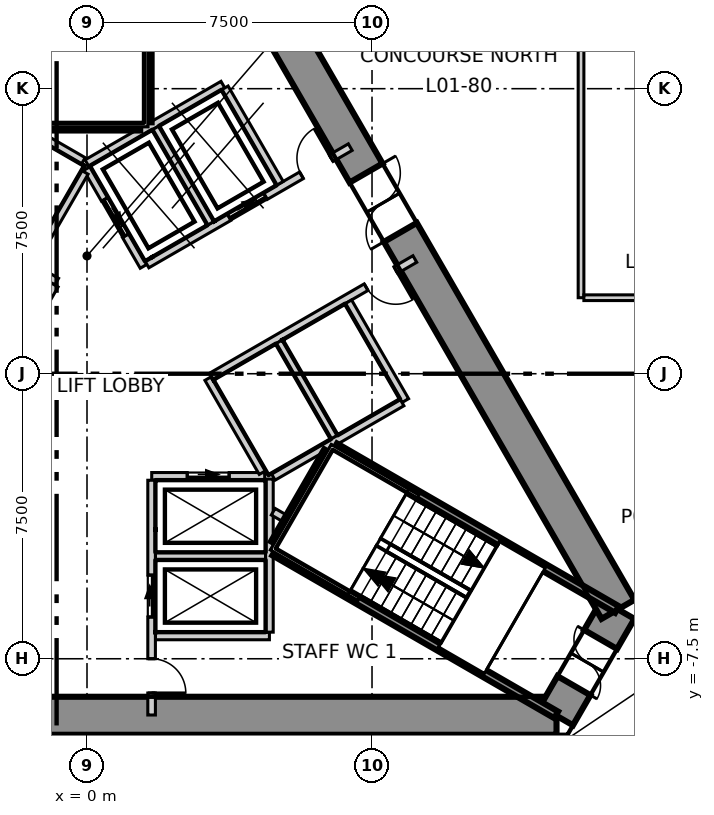
"""IFC4 building model, lengths in metres.
Left out: names, types, materials, properties, quantities, classifications, styles, units other than length and angle.
Written with IfcOpenShell. Run it as: python <this file> out.ifc"""

import sys

from ifc_helpers import new_model, si_unit, direction, frame, frame_2d, origin, place, context, subcontext, project, spatial, polyline, rectangle, outline, extrude, element, fill, save


model = new_model("IFC4")
c1 = context("Model", 3, precision=1e-05, world=origin(), true_north=direction((0.0, 1.0)))
c2 = subcontext(c1, "Body", "Model", "MODEL_VIEW")
j1 = project(units=[si_unit("LENGTHUNIT", "METRE"), si_unit("PLANEANGLEUNIT", "RADIAN")], contexts=[c1])
p1 = place(None, origin())
s1 = spatial("IfcSite", under=j1, at=p1, CompositionType="ELEMENT")
p2 = place(p1, origin())
s2 = spatial("IfcBuilding", under=s1, at=p2, CompositionType="ELEMENT")
p3 = place(p2, frame((0.0, 0.0, 8.5)))
s3 = spatial("IfcBuildingStorey", under=s2, at=p3, CompositionType="ELEMENT", Elevation=8.5)
p4 = place(p3, frame((-12.355, -9.0, -0.4), z_axis=(0.0, 0.0, 1.0), x_axis=(1.0, 0.0, 0.0)))
e1 = element("IfcWall", 1, at=p4, inside=s3, PredefinedType="SHEAR", context=c2, shape_type="SweptSolid", body=[
    extrude(outline(polyline([(-0.289, -0.5), (1.656, -0.5), (3.601, -0.5), (5.547, -0.5), (7.492, -0.5), (9.437, -0.5), (11.382, -0.5), (13.328, -0.5), (15.273, -0.5), (17.218, -0.5), (19.163, -0.5), (21.109, -0.5), (23.054, -0.5), (24.999, -0.5), (24.422, 0.5), (22.566, 0.5), (20.709, 0.5), (18.853, 0.5), (16.996, 0.5), (15.14, 0.5), (13.283, 0.5), (11.427, 0.5), (9.57, 0.5), (7.714, 0.5), (5.857, 0.5), (4.001, 0.5), (2.145, 0.5), (0.288, 0.5), (-0.289, -0.5)])), origin(), (0.0, 0.0, 1.0), 6.0),
])
p5 = place(p3, frame((12.355, -9.0, -0.4), z_axis=(0.0, 0.0, 1.0), x_axis=(0.500077567175, 0.865980615723, 0.0)))
e2 = element("IfcWall", 2, at=p5, inside=s3, PredefinedType="SHEAR", context=c2, shape_type="SweptSolid", body=[
    extrude(outline(polyline([(-0.288, -0.5), (1.617, -0.5), (3.522, -0.5), (2.945, 0.5), (1.617, 0.5), (0.289, 0.499), (-0.288, -0.5)])), origin(), (0.0, 0.0, 1.0), 6.0),
])
p6 = place(p5, frame((0.917, 0.0, 0.4)))
e3 = element("IfcOpeningElement", 3, at=p6, cuts=e2, PredefinedType="OPENING", context=c2, shape_type="SweptSolid", body=[
    extrude(rectangle(XDim=1.4, YDim=2.1, at=frame_2d((0.7, 1.05))), frame((0.0, 0.51, 0.0), z_axis=(0.0, -1.0, 0.0), x_axis=(1.0, 0.0, 0.0)), (0.0, 0.0, 1.0), 1.02),
])
p7 = place(p3, frame((13.972, -6.2, -0.4), z_axis=(0.0, 0.0, 1.0), x_axis=(-0.499992141631, 0.866029940768, 0.0)))
e4 = element("IfcWall", 4, at=p7, inside=s3, PredefinedType="SHEAR", context=c2, shape_type="SweptSolid", body=[
    extrude(outline(polyline([(-0.288, -0.5), (1.657, -0.5), (3.602, -0.5), (5.547, -0.5), (7.493, -0.5), (9.438, -0.5), (11.383, -0.5), (13.328, -0.5), (15.273, -0.5), (17.218, -0.499), (19.164, -0.499), (21.109, -0.499), (23.054, -0.499), (24.999, -0.499), (24.422, 0.5), (22.566, 0.5), (20.709, 0.5), (18.853, 0.5), (16.996, 0.5), (15.14, 0.5), (13.283, 0.5), (11.427, 0.5), (9.57, 0.5), (7.714, 0.5), (5.857, 0.5), (4.001, 0.5), (2.145, 0.5), (0.288, 0.5), (-0.288, -0.5)])), origin(), (0.0, 0.0, 1.0), 6.0),
])
p8 = place(p7, frame((11.455, 0.0, 0.4)))
e5 = element("IfcOpeningElement", 5, at=p8, cuts=e4, PredefinedType="OPENING", context=c2, shape_type="SweptSolid", body=[
    extrude(rectangle(XDim=1.8, YDim=2.1, at=frame_2d((0.9, 1.05))), frame((0.0, 0.51, 0.0), z_axis=(0.0, -1.0, 0.0), x_axis=(1.0, 0.0, 0.0)), (0.0, 0.0, 1.0), 1.02),
])
p9 = place(p3, frame((13.0, 2.0, 0.0), z_axis=(0.0, 0.0, 1.0), x_axis=(0.0, 1.0, 0.0)))
e6 = element("IfcWall", 6, at=p9, inside=s3, PredefinedType="PARTITIONING", context=c2, shape_type="SweptSolid", body=[
    extrude(rectangle(XDim=7.0, YDim=0.15, at=frame_2d((3.5, 0.0))), origin(), (0.0, 0.0, 1.0), 5.6),
])
p10 = place(p3, frame((14.246, -12.125, 0.0), z_axis=(0.0, 0.0, 1.0), x_axis=(0.500018862428, 0.866014513283, 0.0)))
e7 = element("IfcWall", 7, at=p10, inside=s3, PredefinedType="PARTITIONING", context=c2, shape_type="SweptSolid", body=[
    extrude(rectangle(XDim=5.11, YDim=0.15, at=frame_2d((2.555, 0.0))), origin(), (0.0, 0.0, 1.0), 5.6),
])
p11 = place(p10, frame((1.669, 0.0, 0.0)))
e8 = element("IfcOpeningElement", 8, at=p11, cuts=e7, PredefinedType="OPENING", context=c2, shape_type="SweptSolid", body=[
    extrude(rectangle(XDim=1.8, YDim=2.1, at=frame_2d((0.9, 1.05))), frame((0.0, 0.085, 0.0), z_axis=(0.0, -1.0, 0.0), x_axis=(1.0, 0.0, 0.0)), (0.0, 0.0, 1.0), 0.17),
])
p12 = place(p3, frame((13.075, 2.0, 0.0), z_axis=(0.0, 0.0, 1.0), x_axis=(1.0, 0.0, 0.0)))
e9 = element("IfcWall", 9, at=p12, inside=s3, PredefinedType="PARTITIONING", context=c2, shape_type="SweptSolid", body=[
    extrude(rectangle(XDim=6.237, YDim=0.15, at=frame_2d((3.119, 0.0))), origin(), (0.0, 0.0, 1.0), 5.05),
])
p13 = place(p3, frame((1.8, -4.8, 0.0), z_axis=(0.0, 0.0, 1.0), x_axis=(1.0, 0.0, 0.0)))
e10 = element("IfcWall", 10, at=p13, inside=s3, PredefinedType="SOLIDWALL", context=c2, shape_type="SweptSolid", body=[
    extrude(rectangle(XDim=2.9, YDim=0.2, at=frame_2d((1.45, 0.0))), origin(), (0.0, 0.0, 1.0), 5.6),
])
p14 = place(p3, frame((1.8, -6.9, 0.0), z_axis=(0.0, 0.0, 1.0), x_axis=(1.0, 0.0, 0.0)))
e11 = element("IfcWall", 11, at=p14, inside=s3, PredefinedType="SOLIDWALL", context=c2, shape_type="SweptSolid", body=[
    extrude(rectangle(XDim=3.0, YDim=0.2, at=frame_2d((1.5, 0.0))), origin(), (0.0, 0.0, 1.0), 5.6),
])
p15 = place(p3, frame((1.703, -2.7, 0.0), z_axis=(0.0, 0.0, 1.0), x_axis=(1.0, 0.0, 0.0)))
e12 = element("IfcWall", 12, at=p15, inside=s3, PredefinedType="SOLIDWALL", context=c2, shape_type="SweptSolid", body=[
    extrude(rectangle(XDim=2.973, YDim=0.2, at=frame_2d((1.487, 0.0))), origin(), (0.0, 0.0, 1.0), 5.6),
])
p16 = place(p15, frame((0.936, 0.0, 0.0)))
e13 = element("IfcOpeningElement", 13, at=p16, cuts=e12, PredefinedType="OPENING", context=c2, shape_type="SweptSolid", body=[
    extrude(rectangle(XDim=1.1, YDim=2.1, at=frame_2d((0.55, 1.05))), frame((0.0, 0.11, 0.0), z_axis=(0.0, -1.0, 0.0), x_axis=(1.0, 0.0, 0.0)), (0.0, 0.0, 1.0), 0.22),
])
p17 = place(p3, frame((-0.002, 5.541, 0.0), z_axis=(0.0, 0.0, 1.0), x_axis=(0.86600155993, 0.500041296494, 0.0)))
e14 = element("IfcWall", 14, at=p17, inside=s3, PredefinedType="SOLIDWALL", context=c2, shape_type="SweptSolid", body=[
    extrude(rectangle(XDim=4.132, YDim=0.2, at=frame_2d((2.066, 0.0))), origin(), (0.0, 0.0, 1.0), 5.6),
])
p18 = place(p3, frame((0.0, 5.4, 0.0), z_axis=(0.0, 0.0, 1.0), x_axis=(0.500103862429, -0.865965430478, 0.0)))
e15 = element("IfcWall", 15, at=p18, inside=s3, PredefinedType="SOLIDWALL", context=c2, shape_type="SweptSolid", body=[
    extrude(rectangle(XDim=2.973, YDim=0.2, at=frame_2d((1.487, 0.0))), origin(), (0.0, 0.0, 1.0), 5.6),
])
p19 = place(p18, frame((0.937, 0.0, 0.0)))
e16 = element("IfcOpeningElement", 16, at=p19, cuts=e15, PredefinedType="OPENING", context=c2, shape_type="SweptSolid", body=[
    extrude(rectangle(XDim=1.1, YDim=2.1, at=frame_2d((0.55, 1.05))), frame((0.0, 0.11, 0.0), z_axis=(0.0, -1.0, 0.0), x_axis=(1.0, 0.0, 0.0)), (0.0, 0.0, 1.0), 0.22),
])
p20 = place(p3, frame((3.19, -0.125, 0.0), z_axis=(0.0, 0.0, 1.0), x_axis=(0.499988658015, -0.866031951983, 0.0)))
e17 = element("IfcWall", 17, at=p20, inside=s3, PredefinedType="SOLIDWALL", context=c2, shape_type="SweptSolid", body=[
    extrude(rectangle(XDim=2.858, YDim=0.2, at=frame_2d((1.429, 0.0))), origin(), (0.0, 0.0, 1.0), 5.6),
])
p21 = place(p3, frame((1.578, 2.874, 0.0), z_axis=(0.0, 0.0, 1.0), x_axis=(0.866055259465, 0.499948284879, 0.0)))
e18 = element("IfcWall", 18, at=p21, inside=s3, PredefinedType="SOLIDWALL", context=c2, shape_type="SweptSolid", body=[
    extrude(rectangle(XDim=6.177, YDim=0.2, at=frame_2d((3.088, 0.0))), origin(), (0.0, 0.0, 1.0), 5.6),
])
p22 = place(p21, frame((2.496, 0.0, 0.0)))
e19 = element("IfcOpeningElement", 19, at=p22, cuts=e18, PredefinedType="OPENING", context=c2, shape_type="SweptSolid", body=[
    extrude(rectangle(XDim=1.1, YDim=2.1, at=frame_2d((0.55, 1.05))), frame((0.0, 0.11, 0.0), z_axis=(0.0, -1.0, 0.0), x_axis=(1.0, 0.0, 0.0)), (0.0, 0.0, 1.0), 0.22),
])
p23 = place(p21, frame((4.696, 0.0, 0.0)))
e20 = element("IfcOpeningElement", 20, at=p23, cuts=e18, PredefinedType="OPENING", context=c2, shape_type="SweptSolid", body=[
    extrude(rectangle(XDim=0.9, YDim=2.1, at=frame_2d((0.45, 1.05))), frame((0.0, 0.11, 0.0), z_axis=(0.0, -1.0, 0.0), x_axis=(1.0, 0.0, 0.0)), (0.0, 0.0, 1.0), 0.22),
])
p24 = place(p3, frame((1.7, -8.98, 0.0), z_axis=(0.0, 0.0, 1.0), x_axis=(0.0, 1.0, 0.0)))
e21 = element("IfcWall", 21, at=p24, inside=s3, PredefinedType="SOLIDWALL", context=c2, shape_type="SweptSolid", body=[
    extrude(rectangle(XDim=6.177, YDim=0.2, at=frame_2d((3.088, 0.0))), origin(), (0.0, 0.0, 1.0), 5.6),
])
p25 = place(p24, frame((2.58, 0.0, 0.0)))
e22 = element("IfcOpeningElement", 22, at=p25, cuts=e21, PredefinedType="OPENING", context=c2, shape_type="SweptSolid", body=[
    extrude(rectangle(XDim=1.1, YDim=2.1, at=frame_2d((0.55, 1.05))), frame((0.0, 0.11, 0.0), z_axis=(0.0, -1.0, 0.0), x_axis=(1.0, 0.0, 0.0)), (0.0, 0.0, 1.0), 0.22),
])
p26 = place(p24, frame((0.58, 0.0, 0.0)))
e23 = element("IfcOpeningElement", 23, at=p26, cuts=e21, PredefinedType="OPENING", context=c2, shape_type="SweptSolid", body=[
    extrude(rectangle(XDim=0.9, YDim=2.1, at=frame_2d((0.45, 1.05))), frame((0.0, 0.11, 0.0), z_axis=(0.0, -1.0, 0.0), x_axis=(1.0, 0.0, 0.0)), (0.0, 0.0, 1.0), 0.22),
])
p27 = place(p3, frame((4.8, -6.8, 0.0), z_axis=(0.0, 0.0, 1.0), x_axis=(0.0, 1.0, 0.0)))
e24 = element("IfcWall", 24, at=p27, inside=s3, PredefinedType="SOLIDWALL", context=c2, shape_type="SweptSolid", body=[
    extrude(rectangle(XDim=4.029, YDim=0.2, at=frame_2d((2.015, 0.0))), origin(), (0.0, 0.0, 1.0), 5.6),
])
p28 = place(p3, frame((3.278, -0.071, 0.0), z_axis=(0.0, 0.0, 1.0), x_axis=(0.865959795517, 0.500113619639, 0.0)))
e25 = element("IfcWall", 25, at=p28, inside=s3, PredefinedType="SOLIDWALL", context=c2, shape_type="SweptSolid", body=[
    extrude(rectangle(XDim=6.177, YDim=0.2, at=frame_2d((3.088, 0.0))), origin(), (0.0, 0.0, 1.0), 5.6),
])
p29 = place(p28, frame((4.697, 0.0, 0.0)))
e26 = element("IfcOpeningElement", 26, at=p29, cuts=e25, PredefinedType="OPENING", context=c2, shape_type="SweptSolid", body=[
    extrude(rectangle(XDim=0.9, YDim=2.1, at=frame_2d((0.45, 1.05))), frame((0.0, 0.11, 0.0), z_axis=(0.0, -1.0, 0.0), x_axis=(1.0, 0.0, 0.0)), (0.0, 0.0, 1.0), 0.22),
])
p30 = place(p3, frame((3.626, 7.52, 0.0), z_axis=(0.0, 0.0, 1.0), x_axis=(0.500060147554, -0.865990674793, 0.0)))
e27 = element("IfcWall", 27, at=p30, inside=s3, PredefinedType="SOLIDWALL", context=c2, shape_type="SweptSolid", body=[
    extrude(rectangle(XDim=2.9, YDim=0.2, at=frame_2d((1.45, 0.0))), origin(), (0.0, 0.0, 1.0), 5.6),
])
p31 = place(p3, frame((6.876, 1.891, 0.0), z_axis=(0.0, 0.0, 1.0), x_axis=(0.499990139034, -0.866031096941, 0.0)))
e28 = element("IfcWall", 28, at=p31, inside=s3, PredefinedType="SOLIDWALL", context=c2, shape_type="SweptSolid", body=[
    extrude(rectangle(XDim=3.0, YDim=0.2, at=frame_2d((1.5, 0.0))), origin(), (0.0, 0.0, 1.0), 5.6),
])
for number, where, z_axis, x_axis in (
    (29, (1.807, 6.47, 0.0), (0.0, 0.0, 1.0), (0.5, -0.866, 0.0)),
    (30, (5.057, 0.841, 0.0), (0.0, 0.0, 1.0), (0.5, -0.866, 0.0)),
):
    element("IfcWall", number, at=place(p3, frame(where, z_axis=z_axis, x_axis=x_axis)), inside=s3, PredefinedType="SOLIDWALL", context=c2, shape_type="SweptSolid", body=[
        extrude(rectangle(XDim=2.9, YDim=0.2, at=frame_2d((1.45, 0.0))), origin(), (0.0, 0.0, 1.0), 5.6),
    ])
p32 = place(p3, frame((4.9, -2.714, 0.0), z_axis=(0.0, 0.0, 1.0), x_axis=(0.865992350556, 0.500057245502, 0.0)))
e31 = element("IfcWall", 31, at=p32, inside=s3, PredefinedType="SOLIDWALL", context=c2, shape_type="SweptSolid", body=[
    extrude(rectangle(XDim=3.914, YDim=0.2, at=frame_2d((1.957, 0.0))), origin(), (0.0, 0.0, 1.0), 5.6),
])
p33 = place(p3, frame((-1.488, 2.822, 0.0), z_axis=(0.0, 0.0, 1.0), x_axis=(0.866236612152, -0.499633997809, 0.0)))
e32 = element("IfcWall", 32, at=p33, inside=s3, PredefinedType="SOLIDWALL", context=c2, shape_type="SweptSolid", body=[
    extrude(rectangle(XDim=0.796, YDim=0.2, at=frame_2d((0.398, 0.0))), origin(), (0.0, 0.0, 1.0), 5.6),
])
p34 = place(p3, frame((-2.444, -0.433, 0.0), z_axis=(0.0, 0.0, 1.0), x_axis=(0.500035624827, 0.866004834804, 0.0)))
e33 = element("IfcWall", 33, at=p34, inside=s3, PredefinedType="SOLIDWALL", context=c2, shape_type="SweptSolid", body=[
    extrude(rectangle(XDim=3.194, YDim=0.2, at=frame_2d((1.597, 0.0))), origin(), (0.0, 0.0, 1.0), 5.6),
])
p35 = place(p3, frame((-1.67, 6.507, 0.0), z_axis=(0.0, 0.0, 1.0), x_axis=(0.865941441609, -0.500145398563, 0.0)))
e34 = element("IfcWall", 34, at=p35, inside=s3, PredefinedType="SOLIDWALL", context=c2, shape_type="SweptSolid", body=[
    extrude(rectangle(XDim=1.815, YDim=0.2, at=frame_2d((0.908, 0.0))), origin(), (0.0, 0.0, 1.0), 5.6),
])
p36 = place(p3, frame((-1.438, 2.909, 0.0), z_axis=(0.0, 0.0, 1.0), x_axis=(0.499829630636, 0.866123744241, 0.0)))
e35 = element("IfcWall", 35, at=p36, inside=s3, PredefinedType="SOLIDWALL", context=c2, shape_type="SweptSolid", body=[
    extrude(rectangle(XDim=2.761, YDim=0.2, at=frame_2d((1.38, 0.0))), origin(), (0.0, 0.0, 1.0), 5.6),
])
p37 = place(p3, frame((4.9, -3.631, 0.0), z_axis=(0.0, 0.0, 1.0), x_axis=(0.86665063443, -0.498915501706, 0.0)))
e36 = element("IfcWall", 36, at=p37, inside=s3, PredefinedType="SOLIDWALL", context=c2, shape_type="SweptSolid", body=[
    extrude(rectangle(XDim=0.341, YDim=0.2, at=frame_2d((0.17, 0.0))), origin(), (0.0, 0.0, 1.0), 5.6),
])
p38 = place(p3, frame((1.6, 6.615, 0.0), z_axis=(0.0, 0.0, 1.0), x_axis=(0.0, 1.0, 0.0)))
e37 = element("IfcWall", 37, at=p38, inside=s3, PredefinedType="SOLIDWALL", context=c2, shape_type="SweptSolid", body=[
    extrude(rectangle(XDim=8.565, YDim=0.2, at=frame_2d((4.282, 0.0))), origin(), (0.0, 0.0, 1.0), 5.6),
])
p39 = place(p3, frame((-1.4, 6.5, 0.0), z_axis=(0.0, 0.0, 1.0), x_axis=(1.0, 0.0, 0.0)))
e38 = element("IfcWall", 38, at=p39, inside=s3, PredefinedType="SOLIDWALL", context=c2, shape_type="SweptSolid", body=[
    extrude(rectangle(XDim=2.8, YDim=0.2, at=frame_2d((1.4, 0.0))), origin(), (0.0, 0.0, 1.0), 5.6),
])
p40 = place(p3, frame((4.929, -4.462, 0.0), z_axis=(0.0, 0.0, 1.0), x_axis=(0.500200581029, 0.865909567298, 0.0)))
e39 = element("IfcWall", 39, at=p40, inside=s3, PredefinedType="SOLIDWALL", context=c2, shape_type="SweptSolid", body=[
    extrude(rectangle(XDim=2.799, YDim=0.2, at=frame_2d((1.399, 0.0))), origin(), (0.0, 0.0, 1.0), 5.6),
])
p41 = place(p3, frame((6.529, -1.922, 0.0), z_axis=(0.0, 0.0, 1.0), x_axis=(0.866036527536, -0.499980732602, 0.0)))
e40 = element("IfcWall", 40, at=p41, inside=s3, PredefinedType="SOLIDWALL", context=c2, shape_type="SweptSolid", body=[
    extrude(rectangle(XDim=8.564, YDim=0.2, at=frame_2d((4.282, 0.0))), origin(), (0.0, 0.0, 1.0), 5.6),
])
p42 = place(p3, frame((4.929, -4.693, 0.0), z_axis=(0.0, 0.0, 1.0), x_axis=(0.865987152174, -0.50006624788, 0.0)))
e41 = element("IfcWall", 41, at=p42, inside=s3, PredefinedType="SOLIDWALL", context=c2, shape_type="SweptSolid", body=[
    extrude(rectangle(XDim=8.565, YDim=0.2, at=frame_2d((4.282, 0.0))), origin(), (0.0, 0.0, 1.0), 5.6),
])
p43 = place(p16, origin())
e42 = element("IfcDoor", 42, at=p43, inside=s3, OperationType="SLIDING_TO_LEFT", PredefinedType="DOOR", context=c2, shape_type="SweptSolid", body=[
    extrude(rectangle(XDim=1.1, YDim=2.1, at=frame_2d((0.55, 1.05))), frame((0.0, 0.025, 0.0), z_axis=(0.0, -1.0, 0.0), x_axis=(1.0, 0.0, 0.0)), (0.0, 0.0, 1.0), 0.05),
])
fill(e13, e42)
p44 = place(p25, origin())
e43 = element("IfcDoor", 43, at=p44, inside=s3, OperationType="SLIDING_TO_LEFT", PredefinedType="DOOR", context=c2, shape_type="SweptSolid", body=[
    extrude(rectangle(XDim=1.1, YDim=2.1, at=frame_2d((0.55, 1.05))), frame((0.0, 0.025, 0.0), z_axis=(0.0, -1.0, 0.0), x_axis=(1.0, 0.0, 0.0)), (0.0, 0.0, 1.0), 0.05),
])
fill(e22, e43)
p45 = place(p19, origin())
e44 = element("IfcDoor", 44, at=p45, inside=s3, OperationType="SLIDING_TO_LEFT", PredefinedType="DOOR", context=c2, shape_type="SweptSolid", body=[
    extrude(rectangle(XDim=1.1, YDim=2.1, at=frame_2d((0.55, 1.05))), frame((0.0, 0.025, 0.0), z_axis=(0.0, -1.0, 0.0), x_axis=(1.0, 0.0, 0.0)), (0.0, 0.0, 1.0), 0.05),
])
fill(e16, e44)
p46 = place(p22, origin())
e45 = element("IfcDoor", 45, at=p46, inside=s3, OperationType="SLIDING_TO_LEFT", PredefinedType="DOOR", context=c2, shape_type="SweptSolid", body=[
    extrude(rectangle(XDim=1.1, YDim=2.1, at=frame_2d((0.55, 1.05))), frame((0.0, 0.025, 0.0), z_axis=(0.0, -1.0, 0.0), x_axis=(1.0, 0.0, 0.0)), (0.0, 0.0, 1.0), 0.05),
])
fill(e19, e45)
p47 = place(p8, origin())
e46 = element("IfcDoor", 46, at=p47, inside=s3, OperationType="DOUBLE_DOOR_SINGLE_SWING", PredefinedType="DOOR", context=c2, shape_type="SweptSolid", body=[
    extrude(rectangle(XDim=1.8, YDim=2.1, at=frame_2d((0.9, 1.05))), frame((0.0, 0.025, 0.0), z_axis=(0.0, -1.0, 0.0), x_axis=(1.0, 0.0, 0.0)), (0.0, 0.0, 1.0), 0.05),
])
fill(e5, e46)
p48 = place(p6, origin())
e47 = element("IfcDoor", 47, at=p48, inside=s3, OperationType="DOUBLE_DOOR_SINGLE_SWING", PredefinedType="DOOR", context=c2, shape_type="SweptSolid", body=[
    extrude(rectangle(XDim=1.4, YDim=2.1, at=frame_2d((0.7, 1.05))), frame((0.0, 0.025, 0.0), z_axis=(0.0, -1.0, 0.0), x_axis=(1.0, 0.0, 0.0)), (0.0, 0.0, 1.0), 0.05),
])
fill(e3, e47)
p49 = place(p23, origin())
e48 = element("IfcDoor", 48, at=p49, inside=s3, OperationType="SINGLE_SWING_LEFT", PredefinedType="DOOR", context=c2, shape_type="SweptSolid", body=[
    extrude(rectangle(XDim=0.9, YDim=2.1, at=frame_2d((0.45, 1.05))), frame((0.0, 0.025, 0.0), z_axis=(0.0, -1.0, 0.0), x_axis=(1.0, 0.0, 0.0)), (0.0, 0.0, 1.0), 0.05),
])
fill(e20, e48)
p50 = place(p26, origin())
e49 = element("IfcDoor", 49, at=p50, inside=s3, OperationType="SINGLE_SWING_LEFT", PredefinedType="DOOR", context=c2, shape_type="SweptSolid", body=[
    extrude(rectangle(XDim=0.9, YDim=2.1, at=frame_2d((0.45, 1.05))), frame((0.0, 0.025, 0.0), z_axis=(0.0, -1.0, 0.0), x_axis=(1.0, 0.0, 0.0)), (0.0, 0.0, 1.0), 0.05),
])
fill(e23, e49)
p51 = place(p29, origin())
e50 = element("IfcDoor", 50, at=p51, inside=s3, OperationType="SINGLE_SWING_RIGHT", PredefinedType="DOOR", context=c2, shape_type="SweptSolid", body=[
    extrude(rectangle(XDim=0.9, YDim=2.1, at=frame_2d((0.45, 1.05))), frame((0.0, 0.025, 0.0), z_axis=(0.0, -1.0, 0.0), x_axis=(1.0, 0.0, 0.0)), (0.0, 0.0, 1.0), 0.05),
])
fill(e26, e50)
save(model, sys.argv[1])
